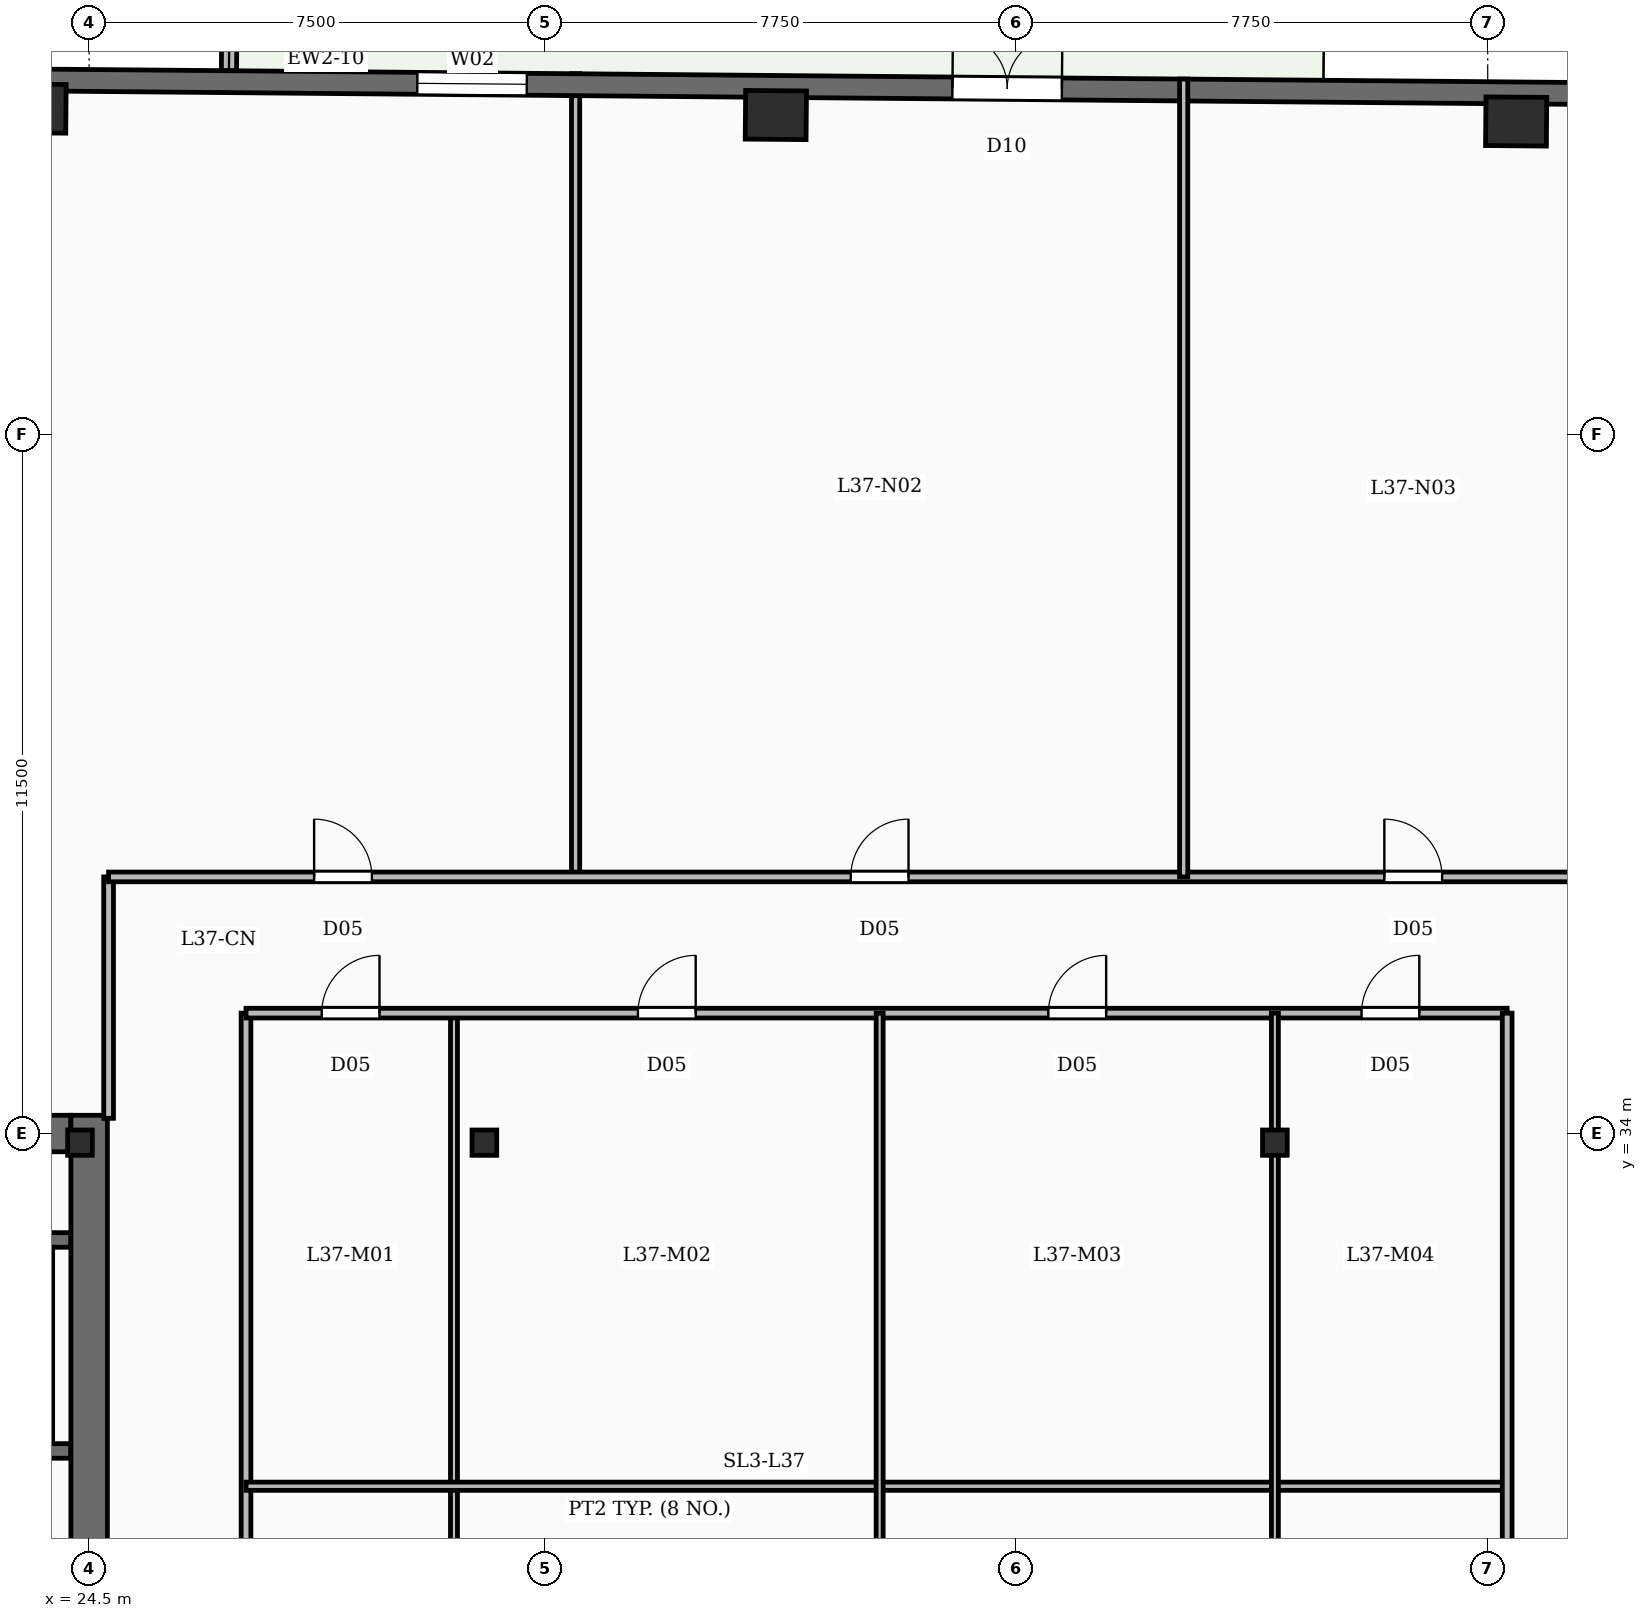
"""IFC4 building model, lengths in metres.
Left out: names, types, materials, properties, quantities, classifications, styles, units other than length and angle.
Written with IfcOpenShell. Run it as: python <this file> out.ifc"""

import sys

from ifc_helpers import new_model, si_unit, direction, frame, frame_2d, origin, origin_2d, place, context, subcontext, project, spatial, rectangle, i_section, extrude, element, fill, save


model = new_model("IFC4")
c1 = context("Model", 3, precision=1e-05, world=origin(), true_north=direction((0.0, 1.0)))
c2 = subcontext(c1, "Body", "Model", "MODEL_VIEW")
j1 = project(units=[si_unit("LENGTHUNIT", "METRE"), si_unit("PLANEANGLEUNIT", "RADIAN")], contexts=[c1])
p1 = place(None, origin())
s1 = spatial("IfcSite", under=j1, at=p1, CompositionType="ELEMENT")
p2 = place(p1, origin())
s2 = spatial("IfcBuilding", under=s1, at=p2, CompositionType="ELEMENT")
p3 = place(p2, frame((0.0, 0.0, 158.45)))
s3 = spatial("IfcBuildingStorey", under=s2, at=p3, CompositionType="ELEMENT", Elevation=158.45)
p4 = place(p3, frame((24.5, 19.0, -0.45), z_axis=(0.0, 0.0, 1.0), x_axis=(0.0, 1.0, 0.0)))
e1 = element("IfcWall", 1, at=p4, inside=s3, PredefinedType="SHEAR", context=c2, shape_type="SweptSolid", body=[
    extrude(rectangle(XDim=15.3, YDim=0.6, at=frame_2d((7.65, 0.0))), origin(), (0.0, 0.0, 1.0), 3.93),
])
p5 = place(p4, frame((2.5, 0.0, 0.45)))
e2 = element("IfcOpeningElement", 2, at=p5, cuts=e1, PredefinedType="OPENING", context=c2, shape_type="SweptSolid", body=[
    extrude(rectangle(XDim=1.05, YDim=2.15, at=frame_2d((0.525, 1.075))), frame((0.0, 0.31, 0.0), z_axis=(0.0, -1.0, 0.0), x_axis=(1.0, 0.0, 0.0)), (0.0, 0.0, 1.0), 0.62),
])
p6 = place(p4, frame((7.0, 0.0, 0.45)))
e3 = element("IfcOpeningElement", 3, at=p6, cuts=e1, PredefinedType="OPENING", context=c2, shape_type="SweptSolid", body=[
    extrude(rectangle(XDim=1.05, YDim=2.15, at=frame_2d((0.525, 1.075))), frame((0.0, 0.31, 0.0), z_axis=(0.0, -1.0, 0.0), x_axis=(1.0, 0.0, 0.0)), (0.0, 0.0, 1.0), 0.62),
])
p7 = place(p3, frame((14.7, 34.0, -0.45), z_axis=(0.0, 0.0, 1.0), x_axis=(1.0, 0.0, 0.0)))
e4 = element("IfcWall", 4, at=p7, inside=s3, PredefinedType="SHEAR", context=c2, shape_type="SweptSolid", body=[
    extrude(rectangle(XDim=9.5, YDim=0.6, at=frame_2d((4.75, 0.0))), origin(), (0.0, 0.0, 1.0), 3.93),
])
for number, where, z_axis, x_axis in (
    (5, (24.35, 33.85, -0.45), (0.0, 0.0, 1.0), (1.0, 0.0, 0.0)),
    (6, (31.0, 33.85, -0.45), (0.0, 0.0, 1.0), (1.0, 0.0, 0.0)),
    (7, (44.0, 33.85, -0.45), (0.0, 0.0, 1.0), (1.0, 0.0, 0.0)),
):
    element("IfcColumn", number, at=place(p3, frame(where, z_axis=z_axis, x_axis=x_axis)), inside=s3, PredefinedType="COLUMN", context=c2, shape_type="SweptSolid", body=[
        extrude(i_section(OverallWidth=0.406, OverallDepth=0.416, WebThickness=0.03, FlangeThickness=0.048, FilletRadius=0.02, at=origin_2d()), origin(), (0.0, 0.0, 1.0), 3.93),
    ])
for number, where, z_axis, x_axis in (
    (8, (47.968, 50.643, -0.45), (0.0, 0.0, 1.0), (1.0, -0.009, 0.0)),
    (9, (35.793, 50.749, -0.45), (0.0, 0.0, 1.0), (1.0, -0.009, 0.0)),
    (10, (23.619, 50.855, -0.45), (0.0, 0.0, 1.0), (1.0, -0.009, 0.0)),
):
    element("IfcColumn", number, at=place(p3, frame(where, z_axis=z_axis, x_axis=x_axis)), inside=s3, PredefinedType="COLUMN", context=c2, shape_type="SweptSolid", body=[
        extrude(rectangle(XDim=1.0, YDim=0.8, at=origin_2d()), origin(), (0.0, 0.0, 1.0), 3.93),
    ])
p8 = place(p3, frame((11.098, 51.435, 0.0), z_axis=(0.0, 0.0, 1.0), x_axis=(0.99996191194, -0.008727810138, 0.0)))
e11 = element("IfcWall", 11, at=p8, inside=s3, PredefinedType="SOLIDWALL", context=c2, shape_type="SweptSolid", body=[
    extrude(rectangle(XDim=49.4, YDim=0.36, at=frame_2d((24.7, 0.0))), origin(), (0.0, 0.0, 1.0), 3.48),
])
p9 = place(p8, frame((27.6, 0.0, 0.0)))
e12 = element("IfcOpeningElement", 12, at=p9, cuts=e11, PredefinedType="OPENING", context=c2, shape_type="SweptSolid", body=[
    extrude(rectangle(XDim=1.8, YDim=2.25, at=frame_2d((0.9, 1.125))), frame((0.0, 0.19, 0.0), z_axis=(0.0, -1.0, 0.0), x_axis=(1.0, 0.0, 0.0)), (0.0, 0.0, 1.0), 0.38),
])
p10 = place(p8, frame((8.0, 0.0, 0.88)))
e13 = element("IfcOpeningElement", 13, at=p10, cuts=e11, PredefinedType="OPENING", context=c2, shape_type="SweptSolid", body=[
    extrude(rectangle(XDim=1.8, YDim=2.15, at=frame_2d((0.9, 1.075))), frame((0.0, 0.19, 0.0), z_axis=(0.0, -1.0, 0.0), x_axis=(1.0, 0.0, 0.0)), (0.0, 0.0, 1.0), 0.38),
])
p11 = place(p8, frame((18.8, 0.0, 0.88)))
e14 = element("IfcOpeningElement", 14, at=p11, cuts=e11, PredefinedType="OPENING", context=c2, shape_type="SweptSolid", body=[
    extrude(rectangle(XDim=1.8, YDim=2.15, at=frame_2d((0.9, 1.075))), frame((0.0, 0.19, 0.0), z_axis=(0.0, -1.0, 0.0), x_axis=(1.0, 0.0, 0.0)), (0.0, 0.0, 1.0), 0.38),
])
p12 = place(p8, frame((40.4, 0.0, 0.88)))
e15 = element("IfcOpeningElement", 15, at=p12, cuts=e11, PredefinedType="OPENING", context=c2, shape_type="SweptSolid", body=[
    extrude(rectangle(XDim=1.8, YDim=2.15, at=frame_2d((0.9, 1.075))), frame((0.0, 0.19, 0.0), z_axis=(0.0, -1.0, 0.0), x_axis=(1.0, 0.0, 0.0)), (0.0, 0.0, 1.0), 0.38),
])
p13 = place(p3, frame((26.799, 51.478, 0.0), z_axis=(0.0, 0.0, 1.0), x_axis=(0.008748393587, 0.999961732073, 0.0)))
e16 = element("IfcWall", 16, at=p13, inside=s3, PredefinedType="PARAPET", context=c2, shape_type="SweptSolid", body=[
    extrude(rectangle(XDim=2.4, YDim=0.25, at=frame_2d((1.2, 0.0))), origin(), (0.0, 0.0, 1.0), 1.12),
])
p14 = place(p3, frame((24.2, 28.78, 0.0), z_axis=(0.0, 0.0, 1.0), x_axis=(-1.0, 0.0, 0.0)))
e17 = element("IfcWall", 17, at=p14, inside=s3, PredefinedType="SOLIDWALL", context=c2, shape_type="SweptSolid", body=[
    extrude(rectangle(XDim=9.5, YDim=0.24, at=frame_2d((4.75, 0.0))), origin(), (0.0, 0.0, 1.0), 3.48),
])
p15 = place(p14, frame((7.68, 0.0, 0.0)))
e18 = element("IfcOpeningElement", 18, at=p15, cuts=e17, PredefinedType="OPENING", context=c2, shape_type="SweptSolid", body=[
    extrude(rectangle(XDim=1.1, YDim=2.15, at=frame_2d((0.55, 1.075))), frame((0.0, 0.13, 0.0), z_axis=(0.0, -1.0, 0.0), x_axis=(1.0, 0.0, 0.0)), (0.0, 0.0, 1.0), 0.26),
])
p16 = place(p3, frame((14.7, 32.25, 0.0), z_axis=(0.0, 0.0, 1.0), x_axis=(1.0, 0.0, 0.0)))
e19 = element("IfcWall", 19, at=p16, inside=s3, PredefinedType="SOLIDWALL", context=c2, shape_type="SweptSolid", body=[
    extrude(rectangle(XDim=9.5, YDim=0.24, at=frame_2d((4.75, 0.0))), origin(), (0.0, 0.0, 1.0), 3.48),
])
p17 = place(p3, frame((23.78, 28.9, 0.0), z_axis=(0.0, 0.0, 1.0), x_axis=(0.0, 1.0, 0.0)))
e20 = element("IfcWall", 20, at=p17, inside=s3, PredefinedType="SOLIDWALL", context=c2, shape_type="SweptSolid", body=[
    extrude(rectangle(XDim=3.23, YDim=0.24, at=frame_2d((1.615, 0.0))), origin(), (0.0, 0.0, 1.0), 3.48),
])
p18 = place(p3, frame((32.5, 38.22, 0.0), z_axis=(0.0, 0.0, 1.0), x_axis=(0.0, 1.0, 0.0)))
e21 = element("IfcWall", 21, at=p18, inside=s3, PredefinedType="PARTITIONING", context=c2, shape_type="SweptSolid", body=[
    extrude(rectangle(XDim=13.208, YDim=0.135, at=frame_2d((6.604, 0.0))), origin(), (0.0, 0.0, 1.0), 2.54),
])
p19 = place(p3, frame((42.5, 38.22, 0.0), z_axis=(0.0, 0.0, 1.0), x_axis=(0.0, 1.0, 0.0)))
e22 = element("IfcWall", 22, at=p19, inside=s3, PredefinedType="PARTITIONING", context=c2, shape_type="SweptSolid", body=[
    extrude(rectangle(XDim=13.121, YDim=0.135, at=frame_2d((6.561, 0.0))), origin(), (0.0, 0.0, 1.0), 2.54),
])
p20 = place(p3, frame((24.82, 34.25, 0.0), z_axis=(0.0, 0.0, 1.0), x_axis=(0.0, 1.0, 0.0)))
e23 = element("IfcWall", 23, at=p20, inside=s3, PredefinedType="PARTITIONING", context=c2, shape_type="SweptSolid", body=[
    extrude(rectangle(XDim=3.97, YDim=0.16, at=frame_2d((1.985, 0.0))), origin(), (0.0, 0.0, 1.0), 2.54),
])
p21 = place(p3, frame((24.82, 38.22, 0.0), z_axis=(0.0, 0.0, 1.0), x_axis=(1.0, 0.0, 0.0)))
e24 = element("IfcWall", 24, at=p21, inside=s3, PredefinedType="PARTITIONING", context=c2, shape_type="SweptSolid", body=[
    extrude(rectangle(XDim=25.26, YDim=0.16, at=frame_2d((12.63, 0.0))), origin(), (0.0, 0.0, 1.0), 2.54),
])
p22 = place(p21, frame((3.38, 0.0, 0.0)))
e25 = element("IfcOpeningElement", 25, at=p22, cuts=e24, PredefinedType="OPENING", context=c2, shape_type="SweptSolid", body=[
    extrude(rectangle(XDim=0.95, YDim=2.15, at=frame_2d((0.475, 1.075))), frame((0.0, 0.09, 0.0), z_axis=(0.0, -1.0, 0.0), x_axis=(1.0, 0.0, 0.0)), (0.0, 0.0, 1.0), 0.18),
])
p23 = place(p21, frame((12.205, 0.0, 0.0)))
e26 = element("IfcOpeningElement", 26, at=p23, cuts=e24, PredefinedType="OPENING", context=c2, shape_type="SweptSolid", body=[
    extrude(rectangle(XDim=0.95, YDim=2.15, at=frame_2d((0.475, 1.075))), frame((0.0, 0.09, 0.0), z_axis=(0.0, -1.0, 0.0), x_axis=(1.0, 0.0, 0.0)), (0.0, 0.0, 1.0), 0.18),
])
p24 = place(p21, frame((20.98, 0.0, 0.0)))
e27 = element("IfcOpeningElement", 27, at=p24, cuts=e24, PredefinedType="OPENING", context=c2, shape_type="SweptSolid", body=[
    extrude(rectangle(XDim=0.95, YDim=2.15, at=frame_2d((0.475, 1.075))), frame((0.0, 0.09, 0.0), z_axis=(0.0, -1.0, 0.0), x_axis=(1.0, 0.0, 0.0)), (0.0, 0.0, 1.0), 0.18),
])
for number, where, z_axis, x_axis in (
    (28, (30.5, 15.38, 0.0), (0.0, 0.0, 1.0), (0.0, 1.0, 0.0)),
    (29, (37.5, 15.38, 0.0), (0.0, 0.0, 1.0), (0.0, 1.0, 0.0)),
    (30, (44.0, 15.38, 0.0), (0.0, 0.0, 1.0), (0.0, 1.0, 0.0)),
):
    element("IfcWall", number, at=place(p3, frame(where, z_axis=z_axis, x_axis=x_axis)), inside=s3, PredefinedType="PARTITIONING", context=c2, shape_type="SweptSolid", body=[
        extrude(rectangle(XDim=20.6, YDim=0.115, at=frame_2d((10.3, 0.0))), origin(), (0.0, 0.0, 1.0), 2.54),
    ])
p25 = place(p3, frame((27.08, 28.2, 0.0), z_axis=(0.0, 0.0, 1.0), x_axis=(1.0, 0.0, 0.0)))
e31 = element("IfcWall", 31, at=p25, inside=s3, PredefinedType="PARTITIONING", context=c2, shape_type="SweptSolid", body=[
    extrude(rectangle(XDim=20.74, YDim=0.135, at=frame_2d((10.37, 0.0))), origin(), (0.0, 0.0, 1.0), 2.54),
])
p26 = place(p3, frame((27.08, 35.98, 0.0), z_axis=(0.0, 0.0, 1.0), x_axis=(1.0, 0.0, 0.0)))
e32 = element("IfcWall", 32, at=p26, inside=s3, PredefinedType="PARTITIONING", context=c2, shape_type="SweptSolid", body=[
    extrude(rectangle(XDim=20.74, YDim=0.16, at=frame_2d((10.37, 0.0))), origin(), (0.0, 0.0, 1.0), 2.54),
])
p27 = place(p26, frame((1.245, 0.0, 0.0)))
e33 = element("IfcOpeningElement", 33, at=p27, cuts=e32, PredefinedType="OPENING", context=c2, shape_type="SweptSolid", body=[
    extrude(rectangle(XDim=0.95, YDim=2.15, at=frame_2d((0.475, 1.075))), frame((0.0, 0.09, 0.0), z_axis=(0.0, -1.0, 0.0), x_axis=(1.0, 0.0, 0.0)), (0.0, 0.0, 1.0), 0.18),
])
p28 = place(p26, frame((6.445, 0.0, 0.0)))
e34 = element("IfcOpeningElement", 34, at=p28, cuts=e32, PredefinedType="OPENING", context=c2, shape_type="SweptSolid", body=[
    extrude(rectangle(XDim=0.95, YDim=2.15, at=frame_2d((0.475, 1.075))), frame((0.0, 0.09, 0.0), z_axis=(0.0, -1.0, 0.0), x_axis=(1.0, 0.0, 0.0)), (0.0, 0.0, 1.0), 0.18),
])
p29 = place(p26, frame((13.195, 0.0, 0.0)))
e35 = element("IfcOpeningElement", 35, at=p29, cuts=e32, PredefinedType="OPENING", context=c2, shape_type="SweptSolid", body=[
    extrude(rectangle(XDim=0.95, YDim=2.15, at=frame_2d((0.475, 1.075))), frame((0.0, 0.09, 0.0), z_axis=(0.0, -1.0, 0.0), x_axis=(1.0, 0.0, 0.0)), (0.0, 0.0, 1.0), 0.18),
])
p30 = place(p26, frame((18.345, 0.0, 0.0)))
e36 = element("IfcOpeningElement", 36, at=p30, cuts=e32, PredefinedType="OPENING", context=c2, shape_type="SweptSolid", body=[
    extrude(rectangle(XDim=0.95, YDim=2.15, at=frame_2d((0.475, 1.075))), frame((0.0, 0.09, 0.0), z_axis=(0.0, -1.0, 0.0), x_axis=(1.0, 0.0, 0.0)), (0.0, 0.0, 1.0), 0.18),
])
for number, where, z_axis, x_axis in (
    (37, (27.08, 15.38, 0.0), (0.0, 0.0, 1.0), (0.0, 1.0, 0.0)),
    (38, (47.82, 15.38, 0.0), (0.0, 0.0, 1.0), (0.0, 1.0, 0.0)),
):
    element("IfcWall", number, at=place(p3, frame(where, z_axis=z_axis, x_axis=x_axis)), inside=s3, PredefinedType="PARTITIONING", context=c2, shape_type="SweptSolid", body=[
        extrude(rectangle(XDim=20.6, YDim=0.16, at=frame_2d((10.3, 0.0))), origin(), (0.0, 0.0, 1.0), 2.54),
    ])
p31 = place(p9, origin())
e39 = element("IfcDoor", 39, at=p31, inside=s3, OperationType="DOUBLE_DOOR_SINGLE_SWING", PredefinedType="DOOR", context=c2, shape_type="SweptSolid", body=[
    extrude(rectangle(XDim=1.8, YDim=2.25, at=frame_2d((0.9, 1.125))), frame((0.0, 0.025, 0.0), z_axis=(0.0, -1.0, 0.0), x_axis=(1.0, 0.0, 0.0)), (0.0, 0.0, 1.0), 0.05),
])
fill(e12, e39)
p32 = place(p11, origin())
e40 = element("IfcWindow", 40, at=p32, inside=s3, PartitioningType="DOUBLE_PANEL_VERTICAL", PredefinedType="WINDOW", context=c2, shape_type="SweptSolid", body=[
    extrude(rectangle(XDim=1.8, YDim=2.15, at=frame_2d((0.9, 1.075))), frame((0.0, 0.03, 0.0), z_axis=(0.0, -1.0, 0.0), x_axis=(1.0, 0.0, 0.0)), (0.0, 0.0, 1.0), 0.06),
])
fill(e14, e40)
p33 = place(p22, origin())
e41 = element("IfcDoor", 41, at=p33, inside=s3, OperationType="SINGLE_SWING_LEFT", PredefinedType="DOOR", context=c2, shape_type="SweptSolid", body=[
    extrude(rectangle(XDim=0.95, YDim=2.15, at=frame_2d((0.475, 1.075))), frame((0.0, 0.025, 0.0), z_axis=(0.0, -1.0, 0.0), x_axis=(1.0, 0.0, 0.0)), (0.0, 0.0, 1.0), 0.05),
])
fill(e25, e41)
p34 = place(p23, origin())
e42 = element("IfcDoor", 42, at=p34, inside=s3, OperationType="SINGLE_SWING_RIGHT", PredefinedType="DOOR", context=c2, shape_type="SweptSolid", body=[
    extrude(rectangle(XDim=0.95, YDim=2.15, at=frame_2d((0.475, 1.075))), frame((0.0, 0.025, 0.0), z_axis=(0.0, -1.0, 0.0), x_axis=(1.0, 0.0, 0.0)), (0.0, 0.0, 1.0), 0.05),
])
fill(e26, e42)
p35 = place(p24, origin())
e43 = element("IfcDoor", 43, at=p35, inside=s3, OperationType="SINGLE_SWING_LEFT", PredefinedType="DOOR", context=c2, shape_type="SweptSolid", body=[
    extrude(rectangle(XDim=0.95, YDim=2.15, at=frame_2d((0.475, 1.075))), frame((0.0, 0.025, 0.0), z_axis=(0.0, -1.0, 0.0), x_axis=(1.0, 0.0, 0.0)), (0.0, 0.0, 1.0), 0.05),
])
fill(e27, e43)
p36 = place(p27, origin())
e44 = element("IfcDoor", 44, at=p36, inside=s3, OperationType="SINGLE_SWING_RIGHT", PredefinedType="DOOR", context=c2, shape_type="SweptSolid", body=[
    extrude(rectangle(XDim=0.95, YDim=2.15, at=frame_2d((0.475, 1.075))), frame((0.0, 0.025, 0.0), z_axis=(0.0, -1.0, 0.0), x_axis=(1.0, 0.0, 0.0)), (0.0, 0.0, 1.0), 0.05),
])
fill(e33, e44)
p37 = place(p28, origin())
e45 = element("IfcDoor", 45, at=p37, inside=s3, OperationType="SINGLE_SWING_RIGHT", PredefinedType="DOOR", context=c2, shape_type="SweptSolid", body=[
    extrude(rectangle(XDim=0.95, YDim=2.15, at=frame_2d((0.475, 1.075))), frame((0.0, 0.025, 0.0), z_axis=(0.0, -1.0, 0.0), x_axis=(1.0, 0.0, 0.0)), (0.0, 0.0, 1.0), 0.05),
])
fill(e34, e45)
p38 = place(p29, origin())
e46 = element("IfcDoor", 46, at=p38, inside=s3, OperationType="SINGLE_SWING_RIGHT", PredefinedType="DOOR", context=c2, shape_type="SweptSolid", body=[
    extrude(rectangle(XDim=0.95, YDim=2.15, at=frame_2d((0.475, 1.075))), frame((0.0, 0.025, 0.0), z_axis=(0.0, -1.0, 0.0), x_axis=(1.0, 0.0, 0.0)), (0.0, 0.0, 1.0), 0.05),
])
fill(e35, e46)
p39 = place(p30, origin())
e47 = element("IfcDoor", 47, at=p39, inside=s3, OperationType="SINGLE_SWING_RIGHT", PredefinedType="DOOR", context=c2, shape_type="SweptSolid", body=[
    extrude(rectangle(XDim=0.95, YDim=2.15, at=frame_2d((0.475, 1.075))), frame((0.0, 0.025, 0.0), z_axis=(0.0, -1.0, 0.0), x_axis=(1.0, 0.0, 0.0)), (0.0, 0.0, 1.0), 0.05),
])
fill(e36, e47)
save(model, sys.argv[1])
